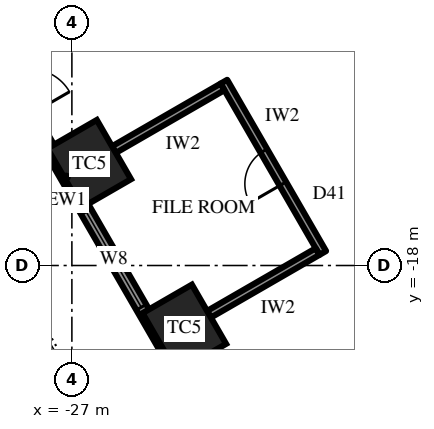
"""IFC4 building model, lengths in metres.
Left out: names, types, materials, properties, quantities, classifications, styles, units other than length and angle.
Written with IfcOpenShell. Run it as: python <this file> out.ifc"""

import sys

from ifc_helpers import new_model, si_unit, direction, frame, frame_2d, origin, origin_2d, place, context, subcontext, project, spatial, rectangle, extrude, element, fill, save


model = new_model("IFC4")
c1 = context("Model", 3, precision=1e-05, world=origin(), true_north=direction((0.0, 1.0)))
c2 = subcontext(c1, "Body", "Model", "MODEL_VIEW")
j1 = project(units=[si_unit("LENGTHUNIT", "METRE"), si_unit("PLANEANGLEUNIT", "RADIAN")], contexts=[c1])
p1 = place(None, origin())
s1 = spatial("IfcSite", under=j1, at=p1, CompositionType="ELEMENT")
p2 = place(p1, origin())
s2 = spatial("IfcBuilding", under=s1, at=p2, CompositionType="ELEMENT")
p3 = place(p2, frame((0.0, 0.0, 127.9)))
s3 = spatial("IfcBuildingStorey", under=s2, at=p3, CompositionType="ELEMENT", Elevation=127.9)
for number, where, z_axis, x_axis in (
    (1, (-26.544, -15.325, 0.0), (0.0, 0.0, 1.0), (0.5, -0.866, 0.0)),
    (2, (-24.042, -19.658, 0.0), (0.0, 0.0, 1.0), (0.5, -0.866, 0.0)),
):
    element("IfcColumn", number, at=place(p3, frame(where, z_axis=z_axis, x_axis=x_axis)), inside=s3, PredefinedType="COLUMN", context=c2, shape_type="SweptSolid", body=[
        extrude(rectangle(XDim=1.8, YDim=1.5, at=origin_2d()), origin(), (0.0, 0.0, 1.0), 4.2),
    ])
p4 = place(p3, frame((-34.656, -2.675, 0.0), z_axis=(0.0, 0.0, 1.0), x_axis=(0.500003084452, -0.866023622968, 0.0)))
e3 = element("IfcWall", 3, at=p4, inside=s3, PredefinedType="SOLIDWALL", context=c2, shape_type="SweptSolid", body=[
    extrude(rectangle(XDim=30.022, YDim=0.3, at=frame_2d((15.011, 0.0))), origin(), (0.0, 0.0, 1.0), 2.3),
])
p5 = place(p4, frame((1.052, 0.0, 0.6)))
e4 = element("IfcOpeningElement", 4, at=p5, cuts=e3, PredefinedType="OPENING", context=c2, shape_type="SweptSolid", body=[
    extrude(rectangle(XDim=2.9, YDim=1.45, at=frame_2d((1.45, 0.725))), frame((0.0, 0.16, 0.0), z_axis=(0.0, -1.0, 0.0), x_axis=(1.0, 0.0, 0.0)), (0.0, 0.0, 1.0), 0.32),
])
p6 = place(p4, frame((6.056, 0.0, 0.6)))
e5 = element("IfcOpeningElement", 5, at=p6, cuts=e3, PredefinedType="OPENING", context=c2, shape_type="SweptSolid", body=[
    extrude(rectangle(XDim=2.9, YDim=1.45, at=frame_2d((1.45, 0.725))), frame((0.0, 0.16, 0.0), z_axis=(0.0, -1.0, 0.0), x_axis=(1.0, 0.0, 0.0)), (0.0, 0.0, 1.0), 0.32),
])
p7 = place(p4, frame((11.909, 0.0, 0.0)))
e6 = element("IfcOpeningElement", 6, at=p7, cuts=e3, PredefinedType="OPENING", context=c2, shape_type="SweptSolid", body=[
    extrude(rectangle(XDim=1.2, YDim=2.2, at=frame_2d((0.6, 1.1))), frame((0.0, 0.16, 0.0), z_axis=(0.0, -1.0, 0.0), x_axis=(1.0, 0.0, 0.0)), (0.0, 0.0, 1.0), 0.32),
])
p8 = place(p4, frame((16.063, 0.0, 0.6)))
e7 = element("IfcOpeningElement", 7, at=p8, cuts=e3, PredefinedType="OPENING", context=c2, shape_type="SweptSolid", body=[
    extrude(rectangle(XDim=2.9, YDim=1.45, at=frame_2d((1.45, 0.725))), frame((0.0, 0.16, 0.0), z_axis=(0.0, -1.0, 0.0), x_axis=(1.0, 0.0, 0.0)), (0.0, 0.0, 1.0), 0.32),
])
p9 = place(p4, frame((21.067, 0.0, 0.6)))
e8 = element("IfcOpeningElement", 8, at=p9, cuts=e3, PredefinedType="OPENING", context=c2, shape_type="SweptSolid", body=[
    extrude(rectangle(XDim=2.9, YDim=1.45, at=frame_2d((1.45, 0.725))), frame((0.0, 0.16, 0.0), z_axis=(0.0, -1.0, 0.0), x_axis=(1.0, 0.0, 0.0)), (0.0, 0.0, 1.0), 0.32),
])
p10 = place(p4, frame((26.07, 0.0, 0.6)))
e9 = element("IfcOpeningElement", 9, at=p10, cuts=e3, PredefinedType="OPENING", context=c2, shape_type="SweptSolid", body=[
    extrude(rectangle(XDim=2.9, YDim=1.45, at=frame_2d((1.45, 0.725))), frame((0.0, 0.16, 0.0), z_axis=(0.0, -1.0, 0.0), x_axis=(1.0, 0.0, 0.0)), (0.0, 0.0, 1.0), 0.32),
])
p11 = place(p3, frame((-23.0, -13.163, 0.0), z_axis=(0.0, 0.0, 1.0), x_axis=(0.500024327116, -0.866011358062, 0.0)))
e10 = element("IfcWall", 10, at=p11, inside=s3, PredefinedType="PARTITIONING", context=c2, shape_type="SweptSolid", body=[
    extrude(rectangle(XDim=5.204, YDim=0.2, at=frame_2d((2.602, 0.0))), origin(), (0.0, 0.0, 1.0), 4.0),
])
p12 = place(p11, frame((2.102, 0.0, 0.0)))
e11 = element("IfcOpeningElement", 11, at=p12, cuts=e10, PredefinedType="OPENING", context=c2, shape_type="SweptSolid", body=[
    extrude(rectangle(XDim=1.0, YDim=2.2, at=frame_2d((0.5, 1.1))), frame((0.0, 0.11, 0.0), z_axis=(0.0, -1.0, 0.0), x_axis=(1.0, 0.0, 0.0)), (0.0, 0.0, 1.0), 0.22),
])
p13 = place(p3, frame((-23.036, -13.3, 0.0), z_axis=(0.0, 0.0, 1.0), x_axis=(-0.866021716278, -0.500006386895, 0.0)))
e12 = element("IfcWall", 12, at=p13, inside=s3, PredefinedType="PARTITIONING", context=c2, shape_type="SweptSolid", body=[
    extrude(rectangle(XDim=3.3, YDim=0.2, at=frame_2d((1.65, 0.0))), origin(), (0.0, 0.0, 1.0), 4.0),
])
p14 = place(p3, frame((-20.534, -17.633, 0.0), z_axis=(0.0, 0.0, 1.0), x_axis=(-0.866008176907, -0.50002983664, 0.0)))
e13 = element("IfcWall", 13, at=p14, inside=s3, PredefinedType="PARTITIONING", context=c2, shape_type="SweptSolid", body=[
    extrude(rectangle(XDim=3.3, YDim=0.2, at=frame_2d((1.65, 0.0))), origin(), (0.0, 0.0, 1.0), 3.082),
])
p15 = place(p8, origin())
e14 = element("IfcWindow", 14, at=p15, inside=s3, PartitioningType="SINGLE_PANEL", PredefinedType="WINDOW", context=c2, shape_type="SweptSolid", body=[
    extrude(rectangle(XDim=2.9, YDim=1.45, at=frame_2d((1.45, 0.725))), frame((0.0, 0.03, 0.0), z_axis=(0.0, -1.0, 0.0), x_axis=(1.0, 0.0, 0.0)), (0.0, 0.0, 1.0), 0.06),
])
fill(e7, e14)
p16 = place(p12, frame((1.0, 0.0, 0.0), z_axis=(0.0, 0.0, 1.0), x_axis=(-1.0, 0.0, 0.0)))
e15 = element("IfcDoor", 15, at=p16, inside=s3, OperationType="SINGLE_SWING_RIGHT", PredefinedType="DOOR", context=c2, shape_type="SweptSolid", body=[
    extrude(rectangle(XDim=1.0, YDim=2.2, at=frame_2d((0.5, 1.1))), frame((0.0, 0.025, 0.0), z_axis=(0.0, -1.0, 0.0), x_axis=(1.0, 0.0, 0.0)), (0.0, 0.0, 1.0), 0.05),
])
fill(e11, e15)
save(model, sys.argv[1])
